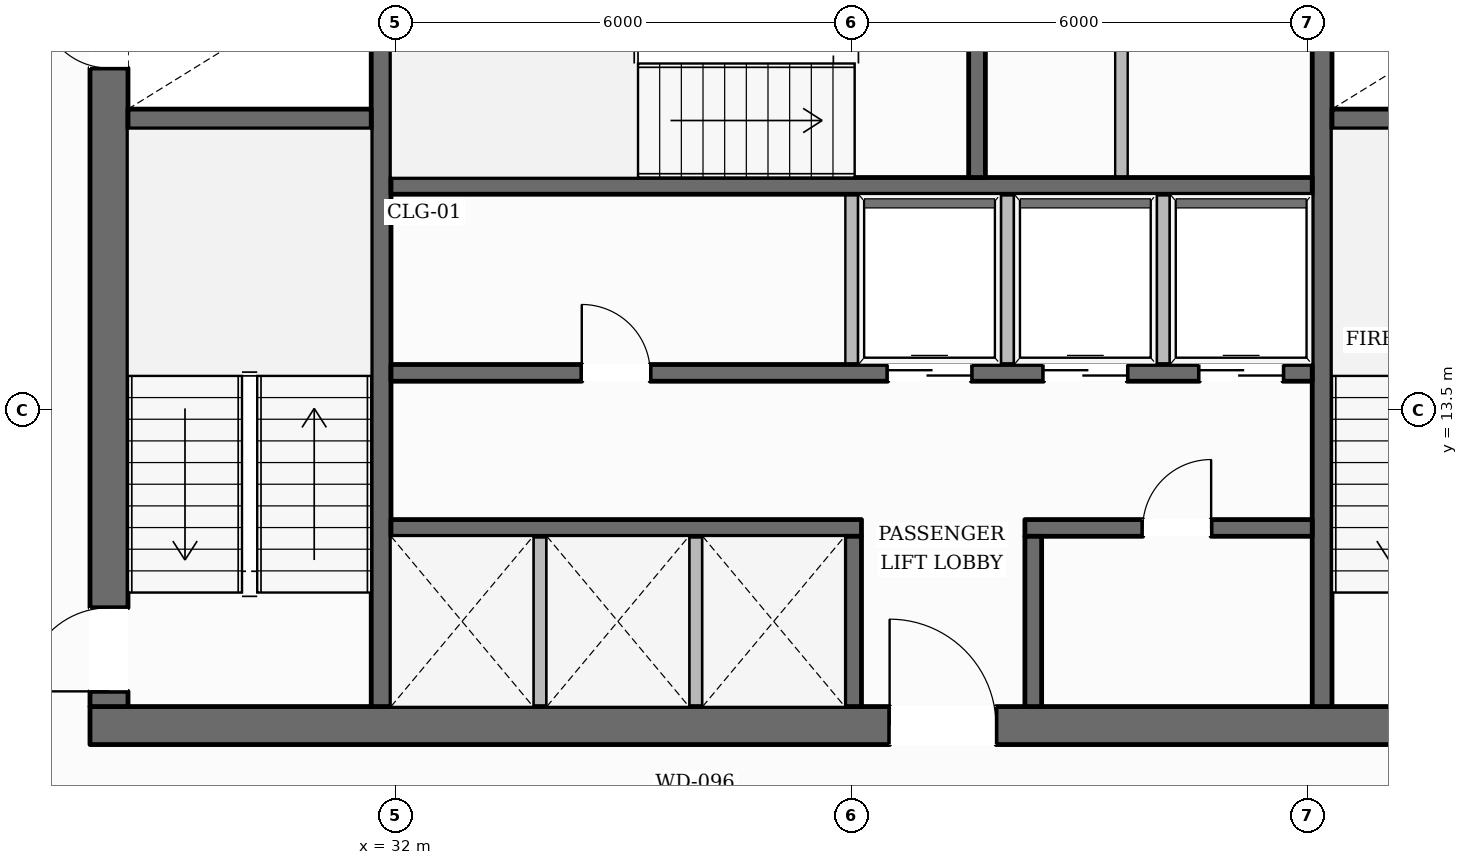
"""IFC4 building model, lengths in metres.
Left out: names, types, materials, properties, quantities, classifications, styles, units other than length and angle.
Written with IfcOpenShell. Run it as: python <this file> out.ifc"""

import sys

from ifc_helpers import new_model, si_unit, direction, frame, frame_2d, origin, place, context, subcontext, project, spatial, rectangle, extrude, element, fill, save


model = new_model("IFC4")
c1 = context("Model", 3, precision=1e-05, world=origin(), true_north=direction((0.0, 1.0)))
c2 = subcontext(c1, "Body", "Model", "MODEL_VIEW")
j1 = project(units=[si_unit("LENGTHUNIT", "METRE"), si_unit("PLANEANGLEUNIT", "RADIAN")], contexts=[c1])
p1 = place(None, origin())
s1 = spatial("IfcSite", under=j1, at=p1, CompositionType="ELEMENT")
p2 = place(p1, origin())
s2 = spatial("IfcBuilding", under=s1, at=p2, CompositionType="ELEMENT")
p3 = place(p2, frame((0.0, 0.0, 104.75)))
s3 = spatial("IfcBuildingStorey", under=s2, at=p3, CompositionType="ELEMENT", Elevation=104.75)
p4 = place(p3, frame((27.98, 9.35, 0.0), z_axis=(0.0, 0.0, 1.0), x_axis=(1.0, 0.0, 0.0)))
e1 = element("IfcWall", 1, at=p4, inside=s3, PredefinedType="SOLIDWALL", context=c2, shape_type="SweptSolid", body=[
    extrude(rectangle(XDim=20.04, YDim=0.5, at=frame_2d((10.02, 0.0))), origin(), (0.0, 0.0, 1.0), 3.6),
])
p5 = place(p4, frame((10.52, 0.0, 0.0)))
e2 = element("IfcOpeningElement", 2, at=p5, cuts=e1, PredefinedType="OPENING", context=c2, shape_type="SweptSolid", body=[
    extrude(rectangle(XDim=1.4, YDim=2.2, at=frame_2d((0.7, 1.1))), frame((0.0, 0.26, 0.0), z_axis=(0.0, -1.0, 0.0), x_axis=(1.0, 0.0, 0.0)), (0.0, 0.0, 1.0), 0.52),
])
p6 = place(p3, frame((28.23, 9.6, 0.0), z_axis=(0.0, 0.0, 1.0), x_axis=(0.0, 1.0, 0.0)))
e3 = element("IfcWall", 3, at=p6, inside=s3, PredefinedType="SOLIDWALL", context=c2, shape_type="SweptSolid", body=[
    extrude(rectangle(XDim=13.0, YDim=0.5, at=frame_2d((6.5, 0.0))), origin(), (0.0, 0.0, 1.0), 3.6),
])
p7 = place(p6, frame((0.2, 0.0, 0.0)))
e4 = element("IfcOpeningElement", 4, at=p7, cuts=e3, PredefinedType="OPENING", context=c2, shape_type="SweptSolid", body=[
    extrude(rectangle(XDim=1.1, YDim=2.15, at=frame_2d((0.55, 1.075))), frame((0.0, 0.26, 0.0), z_axis=(0.0, -1.0, 0.0), x_axis=(1.0, 0.0, 0.0)), (0.0, 0.0, 1.0), 0.52),
])
p8 = place(p6, frame((8.4, 0.0, 0.0)))
e5 = element("IfcOpeningElement", 5, at=p8, cuts=e3, PredefinedType="OPENING", context=c2, shape_type="SweptSolid", body=[
    extrude(rectangle(XDim=0.9, YDim=2.1, at=frame_2d((0.45, 1.05))), frame((0.0, 0.26, 0.0), z_axis=(0.0, -1.0, 0.0), x_axis=(1.0, 0.0, 0.0)), (0.0, 0.0, 1.0), 0.52),
])
p9 = place(p3, frame((31.81, 9.6, 0.0), z_axis=(0.0, 0.0, 1.0), x_axis=(0.0, 1.0, 0.0)))
e6 = element("IfcWall", 6, at=p9, inside=s3, PredefinedType="SHEAR", context=c2, shape_type="SweptSolid", body=[
    extrude(rectangle(XDim=13.0, YDim=0.26, at=frame_2d((6.5, 0.0))), origin(), (0.0, 0.0, 1.0), 3.6),
])
p10 = place(p9, frame((10.925, 0.0, 0.0)))
e7 = element("IfcOpeningElement", 7, at=p10, cuts=e6, PredefinedType="OPENING", context=c2, shape_type="SweptSolid", body=[
    extrude(rectangle(XDim=1.25, YDim=2.25, at=frame_2d((0.625, 1.125))), frame((0.0, 0.14, 0.0), z_axis=(0.0, -1.0, 0.0), x_axis=(1.0, 0.0, 0.0)), (0.0, 0.0, 1.0), 0.28),
])
p11 = place(p3, frame((44.19, 9.6, 0.0), z_axis=(0.0, 0.0, 1.0), x_axis=(0.0, 1.0, 0.0)))
e8 = element("IfcWall", 8, at=p11, inside=s3, PredefinedType="SHEAR", context=c2, shape_type="SweptSolid", body=[
    extrude(rectangle(XDim=13.0, YDim=0.26, at=frame_2d((6.5, 0.0))), origin(), (0.0, 0.0, 1.0), 3.6),
])
p12 = place(p11, frame((10.925, 0.0, 0.0)))
e9 = element("IfcOpeningElement", 9, at=p12, cuts=e8, PredefinedType="OPENING", context=c2, shape_type="SweptSolid", body=[
    extrude(rectangle(XDim=1.25, YDim=2.25, at=frame_2d((0.625, 1.125))), frame((0.0, 0.14, 0.0), z_axis=(0.0, -1.0, 0.0), x_axis=(1.0, 0.0, 0.0)), (0.0, 0.0, 1.0), 0.28),
])
for number, where, z_axis, x_axis in (
    (10, (28.48, 17.33, 0.0), (0.0, 0.0, 1.0), (1.0, 0.0, 0.0)),
    (11, (44.32, 17.33, 0.0), (0.0, 0.0, 1.0), (1.0, 0.0, 0.0)),
):
    element("IfcWall", number, at=place(p3, frame(where, z_axis=z_axis, x_axis=x_axis)), inside=s3, PredefinedType="SHEAR", context=c2, shape_type="SweptSolid", body=[
        extrude(rectangle(XDim=3.2, YDim=0.26, at=frame_2d((1.6, 0.0))), origin(), (0.0, 0.0, 1.0), 3.6),
    ])
p13 = place(p3, frame((31.94, 16.45, 0.0), z_axis=(0.0, 0.0, 1.0), x_axis=(1.0, 0.0, 0.0)))
e12 = element("IfcWall", 12, at=p13, inside=s3, PredefinedType="SOLIDWALL", context=c2, shape_type="SweptSolid", body=[
    extrude(rectangle(XDim=12.12, YDim=0.22, at=frame_2d((6.06, 0.0))), origin(), (0.0, 0.0, 1.0), 3.6),
])
p14 = place(p3, frame((39.65, 16.56, 0.0), z_axis=(0.0, 0.0, 1.0), x_axis=(0.0, 1.0, 0.0)))
e13 = element("IfcWall", 13, at=p14, inside=s3, PredefinedType="SOLIDWALL", context=c2, shape_type="SweptSolid", body=[
    extrude(rectangle(XDim=3.2, YDim=0.22, at=frame_2d((1.6, 0.0))), origin(), (0.0, 0.0, 1.0), 3.6),
])
p15 = place(p3, frame((31.94, 13.99, 0.0), z_axis=(0.0, 0.0, 1.0), x_axis=(1.0, 0.0, 0.0)))
e14 = element("IfcWall", 14, at=p15, inside=s3, PredefinedType="SOLIDWALL", context=c2, shape_type="SweptSolid", body=[
    extrude(rectangle(XDim=12.12, YDim=0.22, at=frame_2d((6.06, 0.0))), origin(), (0.0, 0.0, 1.0), 3.6),
])
p16 = place(p15, frame((2.51, 0.0, 0.0)))
e15 = element("IfcOpeningElement", 15, at=p16, cuts=e14, PredefinedType="OPENING", context=c2, shape_type="SweptSolid", body=[
    extrude(rectangle(XDim=0.9, YDim=2.1, at=frame_2d((0.45, 1.05))), frame((0.0, 0.12, 0.0), z_axis=(0.0, -1.0, 0.0), x_axis=(1.0, 0.0, 0.0)), (0.0, 0.0, 1.0), 0.24),
])
p17 = place(p15, frame((6.535, 0.0, 0.0)))
e16 = element("IfcOpeningElement", 16, at=p17, cuts=e14, PredefinedType="OPENING", context=c2, shape_type="SweptSolid", body=[
    extrude(rectangle(XDim=1.1, YDim=2.2, at=frame_2d((0.55, 1.1))), frame((0.0, 0.12, 0.0), z_axis=(0.0, -1.0, 0.0), x_axis=(1.0, 0.0, 0.0)), (0.0, 0.0, 1.0), 0.24),
])
p18 = place(p15, frame((8.585, 0.0, 0.0)))
e17 = element("IfcOpeningElement", 17, at=p18, cuts=e14, PredefinedType="OPENING", context=c2, shape_type="SweptSolid", body=[
    extrude(rectangle(XDim=1.1, YDim=2.2, at=frame_2d((0.55, 1.1))), frame((0.0, 0.12, 0.0), z_axis=(0.0, -1.0, 0.0), x_axis=(1.0, 0.0, 0.0)), (0.0, 0.0, 1.0), 0.24),
])
p19 = place(p15, frame((10.635, 0.0, 0.0)))
e18 = element("IfcOpeningElement", 18, at=p19, cuts=e14, PredefinedType="OPENING", context=c2, shape_type="SweptSolid", body=[
    extrude(rectangle(XDim=1.1, YDim=2.2, at=frame_2d((0.55, 1.1))), frame((0.0, 0.12, 0.0), z_axis=(0.0, -1.0, 0.0), x_axis=(1.0, 0.0, 0.0)), (0.0, 0.0, 1.0), 0.24),
])
p20 = place(p3, frame((31.94, 11.95, 0.0), z_axis=(0.0, 0.0, 1.0), x_axis=(1.0, 0.0, 0.0)))
e19 = element("IfcWall", 19, at=p20, inside=s3, PredefinedType="SOLIDWALL", context=c2, shape_type="SweptSolid", body=[
    extrude(rectangle(XDim=6.19, YDim=0.22, at=frame_2d((3.095, 0.0))), origin(), (0.0, 0.0, 1.0), 3.6),
])
p21 = place(p3, frame((40.28, 11.95, 0.0), z_axis=(0.0, 0.0, 1.0), x_axis=(1.0, 0.0, 0.0)))
e20 = element("IfcWall", 20, at=p21, inside=s3, PredefinedType="SOLIDWALL", context=c2, shape_type="SweptSolid", body=[
    extrude(rectangle(XDim=3.78, YDim=0.22, at=frame_2d((1.89, 0.0))), origin(), (0.0, 0.0, 1.0), 3.6),
])
p22 = place(p21, frame((1.55, 0.0, 0.0)))
e21 = element("IfcOpeningElement", 21, at=p22, cuts=e20, PredefinedType="OPENING", context=c2, shape_type="SweptSolid", body=[
    extrude(rectangle(XDim=0.9, YDim=2.1, at=frame_2d((0.45, 1.05))), frame((0.0, 0.12, 0.0), z_axis=(0.0, -1.0, 0.0), x_axis=(1.0, 0.0, 0.0)), (0.0, 0.0, 1.0), 0.24),
])
for number, where, z_axis, x_axis in (
    (22, (38.02, 9.6, 0.0), (0.0, 0.0, 1.0), (0.0, 1.0, 0.0)),
    (23, (40.39, 9.6, 0.0), (0.0, 0.0, 1.0), (0.0, 1.0, 0.0)),
):
    element("IfcWall", number, at=place(p3, frame(where, z_axis=z_axis, x_axis=x_axis)), inside=s3, PredefinedType="SOLIDWALL", context=c2, shape_type="SweptSolid", body=[
        extrude(rectangle(XDim=2.24, YDim=0.22, at=frame_2d((1.12, 0.0))), origin(), (0.0, 0.0, 1.0), 3.6),
    ])
p23 = place(p3, frame((14.155, 13.347, 0.0), z_axis=(0.0, 0.0, 1.0), x_axis=(0.493868426836, 0.869536644986, 0.0)))
e24 = element("IfcWall", 24, at=p23, inside=s3, PredefinedType="STANDARD", context=c2, shape_type="SweptSolid", body=[
    extrude(rectangle(XDim=36.121, YDim=0.38, at=frame_2d((18.061, 0.0))), origin(), (0.0, 0.0, 1.0), 3.059),
])
p24 = place(p23, frame((31.935, 0.0, 0.65)))
e25 = element("IfcOpeningElement", 25, at=p24, cuts=e24, PredefinedType="OPENING", context=c2, shape_type="SweptSolid", body=[
    extrude(rectangle(XDim=1.55, YDim=1.75, at=frame_2d((0.775, 0.875))), frame((0.0, 0.2, 0.0), z_axis=(0.0, -1.0, 0.0), x_axis=(1.0, 0.0, 0.0)), (0.0, 0.0, 1.0), 0.4),
])
p25 = place(p23, frame((26.073, 0.0, 0.65)))
e26 = element("IfcOpeningElement", 26, at=p25, cuts=e24, PredefinedType="OPENING", context=c2, shape_type="SweptSolid", body=[
    extrude(rectangle(XDim=1.55, YDim=1.75, at=frame_2d((0.775, 0.875))), frame((0.0, 0.2, 0.0), z_axis=(0.0, -1.0, 0.0), x_axis=(1.0, 0.0, 0.0)), (0.0, 0.0, 1.0), 0.4),
])
p26 = place(p23, frame((14.352, 0.0, 0.65)))
e27 = element("IfcOpeningElement", 27, at=p26, cuts=e24, PredefinedType="OPENING", context=c2, shape_type="SweptSolid", body=[
    extrude(rectangle(XDim=1.55, YDim=1.75, at=frame_2d((0.775, 0.875))), frame((0.0, 0.2, 0.0), z_axis=(0.0, -1.0, 0.0), x_axis=(1.0, 0.0, 0.0)), (0.0, 0.0, 1.0), 0.4),
])
p27 = place(p23, frame((8.491, 0.0, 0.65)))
e28 = element("IfcOpeningElement", 28, at=p27, cuts=e24, PredefinedType="OPENING", context=c2, shape_type="SweptSolid", body=[
    extrude(rectangle(XDim=1.55, YDim=1.75, at=frame_2d((0.775, 0.875))), frame((0.0, 0.2, 0.0), z_axis=(0.0, -1.0, 0.0), x_axis=(1.0, 0.0, 0.0)), (0.0, 0.0, 1.0), 0.4),
])
p28 = place(p23, frame((2.63, 0.0, 0.65)))
e29 = element("IfcOpeningElement", 29, at=p28, cuts=e24, PredefinedType="OPENING", context=c2, shape_type="SweptSolid", body=[
    extrude(rectangle(XDim=1.55, YDim=1.75, at=frame_2d((0.775, 0.875))), frame((0.0, 0.2, 0.0), z_axis=(0.0, -1.0, 0.0), x_axis=(1.0, 0.0, 0.0)), (0.0, 0.0, 1.0), 0.4),
])
p29 = place(p3, frame((44.12, 44.689, 0.0), z_axis=(0.0, 0.0, 1.0), x_axis=(0.498376840975, -0.866960509124, 0.0)))
e30 = element("IfcWall", 30, at=p29, inside=s3, PredefinedType="STANDARD", context=c2, shape_type="SweptSolid", body=[
    extrude(rectangle(XDim=36.441, YDim=0.38, at=frame_2d((18.22, 0.0))), origin(), (0.0, 0.0, 1.0), 3.059),
])
p30 = place(p29, frame((32.234, 0.0, 0.65)))
e31 = element("IfcOpeningElement", 31, at=p30, cuts=e30, PredefinedType="OPENING", context=c2, shape_type="SweptSolid", body=[
    extrude(rectangle(XDim=1.55, YDim=1.75, at=frame_2d((0.775, 0.875))), frame((0.0, 0.2, 0.0), z_axis=(0.0, -1.0, 0.0), x_axis=(1.0, 0.0, 0.0)), (0.0, 0.0, 1.0), 0.4),
])
p31 = place(p29, frame((26.319, 0.0, 0.65)))
e32 = element("IfcOpeningElement", 32, at=p31, cuts=e30, PredefinedType="OPENING", context=c2, shape_type="SweptSolid", body=[
    extrude(rectangle(XDim=1.55, YDim=1.75, at=frame_2d((0.775, 0.875))), frame((0.0, 0.2, 0.0), z_axis=(0.0, -1.0, 0.0), x_axis=(1.0, 0.0, 0.0)), (0.0, 0.0, 1.0), 0.4),
])
p32 = place(p29, frame((14.489, 0.0, 0.65)))
e33 = element("IfcOpeningElement", 33, at=p32, cuts=e30, PredefinedType="OPENING", context=c2, shape_type="SweptSolid", body=[
    extrude(rectangle(XDim=1.55, YDim=1.75, at=frame_2d((0.775, 0.875))), frame((0.0, 0.2, 0.0), z_axis=(0.0, -1.0, 0.0), x_axis=(1.0, 0.0, 0.0)), (0.0, 0.0, 1.0), 0.4),
])
p33 = place(p29, frame((8.573, 0.0, 0.65)))
e34 = element("IfcOpeningElement", 34, at=p33, cuts=e30, PredefinedType="OPENING", context=c2, shape_type="SweptSolid", body=[
    extrude(rectangle(XDim=1.55, YDim=1.75, at=frame_2d((0.775, 0.875))), frame((0.0, 0.2, 0.0), z_axis=(0.0, -1.0, 0.0), x_axis=(1.0, 0.0, 0.0)), (0.0, 0.0, 1.0), 0.4),
])
p34 = place(p29, frame((2.658, 0.0, 0.65)))
e35 = element("IfcOpeningElement", 35, at=p34, cuts=e30, PredefinedType="OPENING", context=c2, shape_type="SweptSolid", body=[
    extrude(rectangle(XDim=1.55, YDim=1.75, at=frame_2d((0.775, 0.875))), frame((0.0, 0.2, 0.0), z_axis=(0.0, -1.0, 0.0), x_axis=(1.0, 0.0, 0.0)), (0.0, 0.0, 1.0), 0.4),
])
for number, where, z_axis, x_axis in (
    (36, (33.9, 9.55, 0.0), (0.0, 0.0, 1.0), (0.0, 1.0, 0.0)),
    (37, (35.95, 9.55, 0.0), (0.0, 0.0, 1.0), (0.0, 1.0, 0.0)),
):
    element("IfcWall", number, at=place(p3, frame(where, z_axis=z_axis, x_axis=x_axis)), inside=s3, PredefinedType="PARTITIONING", context=c2, shape_type="SweptSolid", body=[
        extrude(rectangle(XDim=2.29, YDim=0.165, at=frame_2d((1.145, 0.0))), origin(), (0.0, 0.0, 1.0), 3.6),
    ])
for number, where, z_axis, x_axis in (
    (38, (38.0, 14.1, 0.0), (0.0, 0.0, 1.0), (0.0, 1.0, 0.0)),
    (39, (40.05, 14.1, 0.0), (0.0, 0.0, 1.0), (0.0, 1.0, 0.0)),
    (40, (42.1, 14.1, 0.0), (0.0, 0.0, 1.0), (0.0, 1.0, 0.0)),
):
    element("IfcWall", number, at=place(p3, frame(where, z_axis=z_axis, x_axis=x_axis)), inside=s3, PredefinedType="PARTITIONING", context=c2, shape_type="SweptSolid", body=[
        extrude(rectangle(XDim=2.24, YDim=0.165, at=frame_2d((1.12, 0.0))), origin(), (0.0, 0.0, 1.0), 3.6),
    ])
p35 = place(p3, frame((41.55, 16.56, 0.0), z_axis=(0.0, 0.0, 1.0), x_axis=(0.0, 1.0, 0.0)))
e41 = element("IfcWall", 41, at=p35, inside=s3, PredefinedType="PARTITIONING", context=c2, shape_type="SweptSolid", body=[
    extrude(rectangle(XDim=3.2, YDim=0.165, at=frame_2d((1.6, 0.0))), origin(), (0.0, 0.0, 1.0), 3.6),
])
p36 = place(p7, origin())
e42 = element("IfcDoor", 42, at=p36, inside=s3, OperationType="SINGLE_SWING_LEFT", PredefinedType="DOOR", context=c2, shape_type="SweptSolid", body=[
    extrude(rectangle(XDim=1.1, YDim=2.15, at=frame_2d((0.55, 1.075))), frame((0.0, 0.025, 0.0), z_axis=(0.0, -1.0, 0.0), x_axis=(1.0, 0.0, 0.0)), (0.0, 0.0, 1.0), 0.05),
])
fill(e4, e42)
p37 = place(p8, origin())
e43 = element("IfcDoor", 43, at=p37, inside=s3, OperationType="SINGLE_SWING_RIGHT", PredefinedType="DOOR", context=c2, shape_type="SweptSolid", body=[
    extrude(rectangle(XDim=0.9, YDim=2.1, at=frame_2d((0.45, 1.05))), frame((0.0, 0.025, 0.0), z_axis=(0.0, -1.0, 0.0), x_axis=(1.0, 0.0, 0.0)), (0.0, 0.0, 1.0), 0.05),
])
fill(e5, e43)
p38 = place(p5, origin())
e44 = element("IfcDoor", 44, at=p38, inside=s3, OperationType="SINGLE_SWING_LEFT", PredefinedType="DOOR", context=c2, shape_type="SweptSolid", body=[
    extrude(rectangle(XDim=1.4, YDim=2.2, at=frame_2d((0.7, 1.1))), frame((0.0, 0.025, 0.0), z_axis=(0.0, -1.0, 0.0), x_axis=(1.0, 0.0, 0.0)), (0.0, 0.0, 1.0), 0.05),
])
fill(e2, e44)
p39 = place(p16, origin())
e45 = element("IfcDoor", 45, at=p39, inside=s3, OperationType="SINGLE_SWING_LEFT", PredefinedType="DOOR", context=c2, shape_type="SweptSolid", body=[
    extrude(rectangle(XDim=0.9, YDim=2.1, at=frame_2d((0.45, 1.05))), frame((0.0, 0.025, 0.0), z_axis=(0.0, -1.0, 0.0), x_axis=(1.0, 0.0, 0.0)), (0.0, 0.0, 1.0), 0.05),
])
fill(e15, e45)
p40 = place(p17, origin())
e46 = element("IfcDoor", 46, at=p40, inside=s3, OperationType="DOUBLE_DOOR_SLIDING", PredefinedType="DOOR", context=c2, shape_type="SweptSolid", body=[
    extrude(rectangle(XDim=1.1, YDim=2.2, at=frame_2d((0.55, 1.1))), frame((0.0, 0.025, 0.0), z_axis=(0.0, -1.0, 0.0), x_axis=(1.0, 0.0, 0.0)), (0.0, 0.0, 1.0), 0.05),
])
fill(e16, e46)
p41 = place(p18, origin())
e47 = element("IfcDoor", 47, at=p41, inside=s3, OperationType="DOUBLE_DOOR_SLIDING", PredefinedType="DOOR", context=c2, shape_type="SweptSolid", body=[
    extrude(rectangle(XDim=1.1, YDim=2.2, at=frame_2d((0.55, 1.1))), frame((0.0, 0.025, 0.0), z_axis=(0.0, -1.0, 0.0), x_axis=(1.0, 0.0, 0.0)), (0.0, 0.0, 1.0), 0.05),
])
fill(e17, e47)
p42 = place(p19, origin())
e48 = element("IfcDoor", 48, at=p42, inside=s3, OperationType="DOUBLE_DOOR_SLIDING", PredefinedType="DOOR", context=c2, shape_type="SweptSolid", body=[
    extrude(rectangle(XDim=1.1, YDim=2.2, at=frame_2d((0.55, 1.1))), frame((0.0, 0.025, 0.0), z_axis=(0.0, -1.0, 0.0), x_axis=(1.0, 0.0, 0.0)), (0.0, 0.0, 1.0), 0.05),
])
fill(e18, e48)
p43 = place(p22, origin())
e49 = element("IfcDoor", 49, at=p43, inside=s3, OperationType="SINGLE_SWING_RIGHT", PredefinedType="DOOR", context=c2, shape_type="SweptSolid", body=[
    extrude(rectangle(XDim=0.9, YDim=2.1, at=frame_2d((0.45, 1.05))), frame((0.0, 0.025, 0.0), z_axis=(0.0, -1.0, 0.0), x_axis=(1.0, 0.0, 0.0)), (0.0, 0.0, 1.0), 0.05),
])
fill(e21, e49)
save(model, sys.argv[1])
